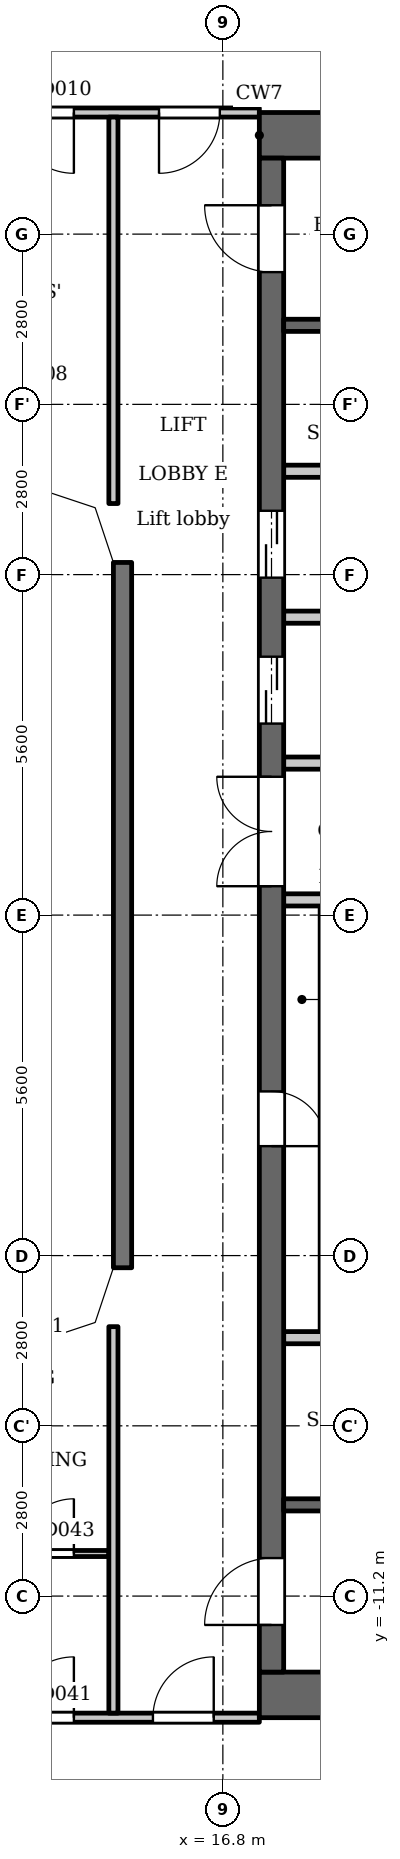
"""IFC4 building model, lengths in metres.
Left out: names, types, materials, properties, quantities, classifications, styles, units other than length and angle.
Written with IfcOpenShell. Run it as: python <this file> out.ifc"""

import sys

from ifc_helpers import new_model, si_unit, direction, frame, frame_2d, origin, place, context, subcontext, project, spatial, polyline, rectangle, outline, extrude, element, fill, save


model = new_model("IFC4")
c1 = context("Model", 3, precision=1e-05, world=origin(), true_north=direction((0.0, 1.0)))
c2 = subcontext(c1, "Body", "Model", "MODEL_VIEW")
j1 = project(units=[si_unit("LENGTHUNIT", "METRE"), si_unit("PLANEANGLEUNIT", "RADIAN")], contexts=[c1])
p1 = place(None, origin())
s1 = spatial("IfcSite", under=j1, at=p1, CompositionType="ELEMENT")
p2 = place(p1, origin())
s2 = spatial("IfcBuilding", under=s1, at=p2, CompositionType="ELEMENT")
p3 = place(p2, frame((0.0, 0.0, 223.9)))
s3 = spatial("IfcBuildingStorey", under=s2, at=p3, CompositionType="ELEMENT", Elevation=223.9)
p4 = place(p3, frame((15.15, 5.8, 0.0), z_axis=(0.0, 0.0, 1.0), x_axis=(0.0, -1.0, 0.0)))
e1 = element("IfcWall", 1, at=p4, inside=s3, PredefinedType="SOLIDWALL", context=c2, shape_type="SweptSolid", body=[
    extrude(rectangle(XDim=11.6, YDim=0.3, at=frame_2d((5.8, 0.0))), origin(), (0.0, 0.0, 1.0), 3.2),
])
for number, where, z_axis, x_axis in (
    (2, (17.4, 12.825, 0.0), (0.0, 0.0, 1.0), (1.0, 0.0, 0.0)),
    (3, (17.4, -12.825, 0.0), (0.0, 0.0, 1.0), (1.0, 0.0, 0.0)),
):
    element("IfcWall", number, at=place(p3, frame(where, z_axis=z_axis, x_axis=x_axis)), inside=s3, PredefinedType="SHEAR", context=c2, shape_type="SweptSolid", body=[
        extrude(rectangle(XDim=7.6, YDim=0.75, at=frame_2d((3.8, 0.0))), origin(), (0.0, 0.0, 1.0), 3.2),
    ])
p5 = place(p3, frame((17.6, -12.45, 0.0), z_axis=(0.0, 0.0, 1.0), x_axis=(0.0, 1.0, 0.0)))
e4 = element("IfcWall", 4, at=p5, inside=s3, PredefinedType="SHEAR", context=c2, shape_type="SweptSolid", body=[
    extrude(rectangle(XDim=24.9, YDim=0.4, at=frame_2d((12.45, 0.0))), origin(), (0.0, 0.0, 1.0), 3.2),
])
p6 = place(p5, frame((8.65, 0.0, 0.0)))
e5 = element("IfcOpeningElement", 5, at=p6, cuts=e4, PredefinedType="OPENING", context=c2, shape_type="SweptSolid", body=[
    extrude(rectangle(XDim=0.9, YDim=2.1, at=frame_2d((0.45, 1.05))), frame((0.0, 0.21, 0.0), z_axis=(0.0, -1.0, 0.0), x_axis=(1.0, 0.0, 0.0)), (0.0, 0.0, 1.0), 0.42),
])
p7 = place(p5, frame((15.6, 0.0, 0.0)))
e6 = element("IfcOpeningElement", 6, at=p7, cuts=e4, PredefinedType="OPENING", context=c2, shape_type="SweptSolid", body=[
    extrude(rectangle(XDim=1.1, YDim=2.1, at=frame_2d((0.55, 1.05))), frame((0.0, 0.21, 0.0), z_axis=(0.0, -1.0, 0.0), x_axis=(1.0, 0.0, 0.0)), (0.0, 0.0, 1.0), 0.42),
])
p8 = place(p5, frame((18.0, 0.0, 0.0)))
e7 = element("IfcOpeningElement", 7, at=p8, cuts=e4, PredefinedType="OPENING", context=c2, shape_type="SweptSolid", body=[
    extrude(rectangle(XDim=1.1, YDim=2.1, at=frame_2d((0.55, 1.05))), frame((0.0, 0.21, 0.0), z_axis=(0.0, -1.0, 0.0), x_axis=(1.0, 0.0, 0.0)), (0.0, 0.0, 1.0), 0.42),
])
p9 = place(p5, frame((23.025, 0.0, 0.0)))
e8 = element("IfcOpeningElement", 8, at=p9, cuts=e4, PredefinedType="OPENING", context=c2, shape_type="SweptSolid", body=[
    extrude(rectangle(XDim=1.1, YDim=2.1, at=frame_2d((0.55, 1.05))), frame((0.0, 0.21, 0.0), z_axis=(0.0, -1.0, 0.0), x_axis=(1.0, 0.0, 0.0)), (0.0, 0.0, 1.0), 0.42),
])
p10 = place(p5, frame((0.775, 0.0, 0.0)))
e9 = element("IfcOpeningElement", 9, at=p10, cuts=e4, PredefinedType="OPENING", context=c2, shape_type="SweptSolid", body=[
    extrude(rectangle(XDim=1.1, YDim=2.1, at=frame_2d((0.55, 1.05))), frame((0.0, 0.21, 0.0), z_axis=(0.0, -1.0, 0.0), x_axis=(1.0, 0.0, 0.0)), (0.0, 0.0, 1.0), 0.42),
])
p11 = place(p5, frame((12.925, 0.0, 0.0)))
e10 = element("IfcOpeningElement", 10, at=p11, cuts=e4, PredefinedType="OPENING", context=c2, shape_type="SweptSolid", body=[
    extrude(rectangle(XDim=1.8, YDim=2.1, at=frame_2d((0.9, 1.05))), frame((0.0, 0.21, 0.0), z_axis=(0.0, -1.0, 0.0), x_axis=(1.0, 0.0, 0.0)), (0.0, 0.0, 1.0), 0.42),
])
p12 = place(p3, frame((17.8, -9.7, 0.0), z_axis=(0.0, 0.0, 1.0), x_axis=(1.0, 0.0, 0.0)))
e11 = element("IfcWall", 11, at=p12, inside=s3, PredefinedType="SHEAR", context=c2, shape_type="SweptSolid", body=[
    extrude(rectangle(XDim=5.65, YDim=0.2, at=frame_2d((2.825, 0.0))), origin(), (0.0, 0.0, 1.0), 3.2),
])
p13 = place(p12, frame((0.85, 0.0, 0.0)))
e12 = element("IfcOpeningElement", 12, at=p13, cuts=e11, PredefinedType="OPENING", context=c2, shape_type="SweptSolid", body=[
    extrude(rectangle(XDim=1.1, YDim=2.1, at=frame_2d((0.55, 1.05))), frame((0.0, 0.11, 0.0), z_axis=(0.0, -1.0, 0.0), x_axis=(1.0, 0.0, 0.0)), (0.0, 0.0, 1.0), 0.22),
])
p14 = place(p12, frame((3.75, 0.0, 0.0)))
e13 = element("IfcOpeningElement", 13, at=p14, cuts=e11, PredefinedType="OPENING", context=c2, shape_type="SweptSolid", body=[
    extrude(rectangle(XDim=1.1, YDim=2.1, at=frame_2d((0.55, 1.05))), frame((0.0, 0.11, 0.0), z_axis=(0.0, -1.0, 0.0), x_axis=(1.0, 0.0, 0.0)), (0.0, 0.0, 1.0), 0.22),
])
p15 = place(p3, frame((17.8, -6.95, 0.0), z_axis=(0.0, 0.0, 1.0), x_axis=(1.0, 0.0, 0.0)))
e14 = element("IfcWall", 14, at=p15, inside=s3, PredefinedType="PARTITIONING", context=c2, shape_type="SweptSolid", body=[
    extrude(rectangle(XDim=2.8, YDim=0.2, at=frame_2d((1.4, 0.0))), origin(), (0.0, 0.0, 1.0), 3.2),
])
p16 = place(p3, frame((17.8, 0.25, 0.0), z_axis=(0.0, 0.0, 1.0), x_axis=(1.0, 0.0, 0.0)))
e15 = element("IfcWall", 15, at=p16, inside=s3, PredefinedType="PARTITIONING", context=c2, shape_type="SweptSolid", body=[
    extrude(rectangle(XDim=3.0, YDim=0.2, at=frame_2d((1.5, 0.0))), origin(), (0.0, 0.0, 1.0), 3.2),
])
p17 = place(p16, frame((1.35, 0.0, 0.0)))
e16 = element("IfcOpeningElement", 16, at=p17, cuts=e15, PredefinedType="OPENING", context=c2, shape_type="SweptSolid", body=[
    extrude(rectangle(XDim=0.9, YDim=2.1, at=frame_2d((0.45, 1.05))), frame((0.0, 0.11, 0.0), z_axis=(0.0, -1.0, 0.0), x_axis=(1.0, 0.0, 0.0)), (0.0, 0.0, 1.0), 0.22),
])
p18 = place(p3, frame((17.8, 2.5, 0.0), z_axis=(0.0, 0.0, 1.0), x_axis=(1.0, 0.0, 0.0)))
e17 = element("IfcWall", 17, at=p18, inside=s3, PredefinedType="PARTITIONING", context=c2, shape_type="SweptSolid", body=[
    extrude(rectangle(XDim=3.0, YDim=0.2, at=frame_2d((1.5, 0.0))), origin(), (0.0, 0.0, 1.0), 3.2),
])
for number, where, z_axis, x_axis in (
    (18, (17.8, 4.9, 0.0), (0.0, 0.0, 1.0), (1.0, 0.0, 0.0)),
    (19, (17.8, 7.3, 0.0), (0.0, 0.0, 1.0), (1.0, 0.0, 0.0)),
):
    element("IfcWall", number, at=place(p3, frame(where, z_axis=z_axis, x_axis=x_axis)), inside=s3, PredefinedType="PARTITIONING", context=c2, shape_type="SweptSolid", body=[
        extrude(rectangle(XDim=2.8, YDim=0.2, at=frame_2d((1.4, 0.0))), origin(), (0.0, 0.0, 1.0), 3.2),
    ])
p19 = place(p3, frame((17.8, 9.7, 0.0), z_axis=(0.0, 0.0, 1.0), x_axis=(1.0, 0.0, 0.0)))
e20 = element("IfcWall", 20, at=p19, inside=s3, PredefinedType="SHEAR", context=c2, shape_type="SweptSolid", body=[
    extrude(rectangle(XDim=5.65, YDim=0.2, at=frame_2d((2.825, 0.0))), origin(), (0.0, 0.0, 1.0), 3.2),
])
p20 = place(p19, frame((0.85, 0.0, 0.0)))
e21 = element("IfcOpeningElement", 21, at=p20, cuts=e20, PredefinedType="OPENING", context=c2, shape_type="SweptSolid", body=[
    extrude(rectangle(XDim=1.1, YDim=2.1, at=frame_2d((0.55, 1.05))), frame((0.0, 0.11, 0.0), z_axis=(0.0, -1.0, 0.0), x_axis=(1.0, 0.0, 0.0)), (0.0, 0.0, 1.0), 0.22),
])
p21 = place(p19, frame((3.75, 0.0, 0.0)))
e22 = element("IfcOpeningElement", 22, at=p21, cuts=e20, PredefinedType="OPENING", context=c2, shape_type="SweptSolid", body=[
    extrude(rectangle(XDim=1.1, YDim=2.1, at=frame_2d((0.55, 1.05))), frame((0.0, 0.11, 0.0), z_axis=(0.0, -1.0, 0.0), x_axis=(1.0, 0.0, 0.0)), (0.0, 0.0, 1.0), 0.22),
])
p22 = place(p3, frame((-17.4, -13.2, 0.0), z_axis=(0.0, 0.0, 1.0), x_axis=(1.0, 0.0, 0.0)))
e23 = element("IfcWall", 23, at=p22, inside=s3, PredefinedType="PARTITIONING", context=c2, shape_type="SweptSolid", body=[
    extrude(rectangle(XDim=34.8, YDim=0.15, at=frame_2d((17.4, 0.0))), origin(), (0.0, 0.0, 1.0), 3.2),
])
p23 = place(p22, frame((0.65, 0.0, 0.0)))
e24 = element("IfcOpeningElement", 24, at=p23, cuts=e23, PredefinedType="OPENING", context=c2, shape_type="SweptSolid", body=[
    extrude(rectangle(XDim=1.0, YDim=2.1, at=frame_2d((0.5, 1.05))), frame((0.0, 0.085, 0.0), z_axis=(0.0, -1.0, 0.0), x_axis=(1.0, 0.0, 0.0)), (0.0, 0.0, 1.0), 0.17),
])
p24 = place(p22, frame((33.05, 0.0, 0.0)))
e25 = element("IfcOpeningElement", 25, at=p24, cuts=e23, PredefinedType="OPENING", context=c2, shape_type="SweptSolid", body=[
    extrude(rectangle(XDim=1.0, YDim=2.1, at=frame_2d((0.5, 1.05))), frame((0.0, 0.085, 0.0), z_axis=(0.0, -1.0, 0.0), x_axis=(1.0, 0.0, 0.0)), (0.0, 0.0, 1.0), 0.17),
])
p25 = place(p22, frame((10.15, 0.0, 0.0)))
e26 = element("IfcOpeningElement", 26, at=p25, cuts=e23, PredefinedType="OPENING", context=c2, shape_type="SweptSolid", body=[
    extrude(rectangle(XDim=1.0, YDim=2.1, at=frame_2d((0.5, 1.05))), frame((0.0, 0.085, 0.0), z_axis=(0.0, -1.0, 0.0), x_axis=(1.0, 0.0, 0.0)), (0.0, 0.0, 1.0), 0.17),
])
p26 = place(p22, frame((12.5, 0.0, 0.0)))
e27 = element("IfcOpeningElement", 27, at=p26, cuts=e23, PredefinedType="OPENING", context=c2, shape_type="SweptSolid", body=[
    extrude(rectangle(XDim=1.0, YDim=2.1, at=frame_2d((0.5, 1.05))), frame((0.0, 0.085, 0.0), z_axis=(0.0, -1.0, 0.0), x_axis=(1.0, 0.0, 0.0)), (0.0, 0.0, 1.0), 0.17),
])
p27 = place(p22, frame((18.0, 0.0, 0.0)))
e28 = element("IfcOpeningElement", 28, at=p27, cuts=e23, PredefinedType="OPENING", context=c2, shape_type="SweptSolid", body=[
    extrude(rectangle(XDim=1.0, YDim=2.1, at=frame_2d((0.5, 1.05))), frame((0.0, 0.085, 0.0), z_axis=(0.0, -1.0, 0.0), x_axis=(1.0, 0.0, 0.0)), (0.0, 0.0, 1.0), 0.17),
])
p28 = place(p22, frame((30.75, 0.0, 0.0)))
e29 = element("IfcOpeningElement", 29, at=p28, cuts=e23, PredefinedType="OPENING", context=c2, shape_type="SweptSolid", body=[
    extrude(rectangle(XDim=1.0, YDim=2.1, at=frame_2d((0.5, 1.05))), frame((0.0, 0.085, 0.0), z_axis=(0.0, -1.0, 0.0), x_axis=(1.0, 0.0, 0.0)), (0.0, 0.0, 1.0), 0.17),
])
p29 = place(p3, frame((-14.925, -10.5, 0.0), z_axis=(0.0, 0.0, 1.0), x_axis=(1.0, 0.0, 0.0)))
e30 = element("IfcWall", 30, at=p29, inside=s3, PredefinedType="PARTITIONING", context=c2, shape_type="SweptSolid", body=[
    extrude(rectangle(XDim=29.85, YDim=0.1, at=frame_2d((14.925, 0.0))), origin(), (0.0, 0.0, 1.0), 3.2),
])
p30 = place(p29, frame((2.325, 0.0, 0.0)))
e31 = element("IfcOpeningElement", 31, at=p30, cuts=e30, PredefinedType="OPENING", context=c2, shape_type="SweptSolid", body=[
    extrude(rectangle(XDim=0.8, YDim=2.1, at=frame_2d((0.4, 1.05))), frame((0.0, 0.06, 0.0), z_axis=(0.0, -1.0, 0.0), x_axis=(1.0, 0.0, 0.0)), (0.0, 0.0, 1.0), 0.12),
])
p31 = place(p29, frame((7.775, 0.0, 0.0)))
e32 = element("IfcOpeningElement", 32, at=p31, cuts=e30, PredefinedType="OPENING", context=c2, shape_type="SweptSolid", body=[
    extrude(rectangle(XDim=0.9, YDim=2.1, at=frame_2d((0.45, 1.05))), frame((0.0, 0.06, 0.0), z_axis=(0.0, -1.0, 0.0), x_axis=(1.0, 0.0, 0.0)), (0.0, 0.0, 1.0), 0.12),
])
p32 = place(p29, frame((13.575, 0.0, 0.0)))
e33 = element("IfcOpeningElement", 33, at=p32, cuts=e30, PredefinedType="OPENING", context=c2, shape_type="SweptSolid", body=[
    extrude(rectangle(XDim=0.8, YDim=2.1, at=frame_2d((0.4, 1.05))), frame((0.0, 0.06, 0.0), z_axis=(0.0, -1.0, 0.0), x_axis=(1.0, 0.0, 0.0)), (0.0, 0.0, 1.0), 0.12),
])
p33 = place(p29, frame((10.125, 0.0, 0.0)))
e34 = element("IfcOpeningElement", 34, at=p33, cuts=e30, PredefinedType="OPENING", context=c2, shape_type="SweptSolid", body=[
    extrude(rectangle(XDim=0.9, YDim=2.1, at=frame_2d((0.45, 1.05))), frame((0.0, 0.06, 0.0), z_axis=(0.0, -1.0, 0.0), x_axis=(1.0, 0.0, 0.0)), (0.0, 0.0, 1.0), 0.12),
])
p34 = place(p29, frame((18.825, 0.0, 0.0)))
e35 = element("IfcOpeningElement", 35, at=p34, cuts=e30, PredefinedType="OPENING", context=c2, shape_type="SweptSolid", body=[
    extrude(rectangle(XDim=0.8, YDim=2.1, at=frame_2d((0.4, 1.05))), frame((0.0, 0.06, 0.0), z_axis=(0.0, -1.0, 0.0), x_axis=(1.0, 0.0, 0.0)), (0.0, 0.0, 1.0), 0.12),
])
p35 = place(p29, frame((15.625, 0.0, 0.0)))
e36 = element("IfcOpeningElement", 36, at=p35, cuts=e30, PredefinedType="OPENING", context=c2, shape_type="SweptSolid", body=[
    extrude(rectangle(XDim=0.9, YDim=2.1, at=frame_2d((0.45, 1.05))), frame((0.0, 0.06, 0.0), z_axis=(0.0, -1.0, 0.0), x_axis=(1.0, 0.0, 0.0)), (0.0, 0.0, 1.0), 0.12),
])
p36 = place(p29, frame((24.675, 0.0, 0.0)))
e37 = element("IfcOpeningElement", 37, at=p36, cuts=e30, PredefinedType="OPENING", context=c2, shape_type="SweptSolid", body=[
    extrude(rectangle(XDim=0.8, YDim=2.1, at=frame_2d((0.4, 1.05))), frame((0.0, 0.06, 0.0), z_axis=(0.0, -1.0, 0.0), x_axis=(1.0, 0.0, 0.0)), (0.0, 0.0, 1.0), 0.12),
])
p37 = place(p29, frame((28.375, 0.0, 0.0)))
e38 = element("IfcOpeningElement", 38, at=p37, cuts=e30, PredefinedType="OPENING", context=c2, shape_type="SweptSolid", body=[
    extrude(rectangle(XDim=0.9, YDim=2.1, at=frame_2d((0.45, 1.05))), frame((0.0, 0.06, 0.0), z_axis=(0.0, -1.0, 0.0), x_axis=(1.0, 0.0, 0.0)), (0.0, 0.0, 1.0), 0.12),
])
p38 = place(p3, frame((-17.4, 13.2, 0.0), z_axis=(0.0, 0.0, 1.0), x_axis=(1.0, 0.0, 0.0)))
e39 = element("IfcWall", 39, at=p38, inside=s3, PredefinedType="PARTITIONING", context=c2, shape_type="SweptSolid", body=[
    extrude(rectangle(XDim=34.8, YDim=0.15, at=frame_2d((17.4, 0.0))), origin(), (0.0, 0.0, 1.0), 3.2),
])
p39 = place(p38, frame((0.75, 0.0, 0.0)))
e40 = element("IfcOpeningElement", 40, at=p39, cuts=e39, PredefinedType="OPENING", context=c2, shape_type="SweptSolid", body=[
    extrude(rectangle(XDim=1.0, YDim=2.1, at=frame_2d((0.5, 1.05))), frame((0.0, 0.085, 0.0), z_axis=(0.0, -1.0, 0.0), x_axis=(1.0, 0.0, 0.0)), (0.0, 0.0, 1.0), 0.17),
])
p40 = place(p38, frame((33.15, 0.0, 0.0)))
e41 = element("IfcOpeningElement", 41, at=p40, cuts=e39, PredefinedType="OPENING", context=c2, shape_type="SweptSolid", body=[
    extrude(rectangle(XDim=1.0, YDim=2.1, at=frame_2d((0.5, 1.05))), frame((0.0, 0.085, 0.0), z_axis=(0.0, -1.0, 0.0), x_axis=(1.0, 0.0, 0.0)), (0.0, 0.0, 1.0), 0.17),
])
p41 = place(p38, frame((3.05, 0.0, 0.0)))
e42 = element("IfcOpeningElement", 42, at=p41, cuts=e39, PredefinedType="OPENING", context=c2, shape_type="SweptSolid", body=[
    extrude(rectangle(XDim=1.0, YDim=2.1, at=frame_2d((0.5, 1.05))), frame((0.0, 0.085, 0.0), z_axis=(0.0, -1.0, 0.0), x_axis=(1.0, 0.0, 0.0)), (0.0, 0.0, 1.0), 0.17),
])
p42 = place(p38, frame((10.1, 0.0, 0.0)))
e43 = element("IfcOpeningElement", 43, at=p42, cuts=e39, PredefinedType="OPENING", context=c2, shape_type="SweptSolid", body=[
    extrude(rectangle(XDim=1.0, YDim=2.1, at=frame_2d((0.5, 1.05))), frame((0.0, 0.085, 0.0), z_axis=(0.0, -1.0, 0.0), x_axis=(1.0, 0.0, 0.0)), (0.0, 0.0, 1.0), 0.17),
])
p43 = place(p38, frame((12.45, 0.0, 0.0)))
e44 = element("IfcOpeningElement", 44, at=p43, cuts=e39, PredefinedType="OPENING", context=c2, shape_type="SweptSolid", body=[
    extrude(rectangle(XDim=1.0, YDim=2.1, at=frame_2d((0.5, 1.05))), frame((0.0, 0.085, 0.0), z_axis=(0.0, -1.0, 0.0), x_axis=(1.0, 0.0, 0.0)), (0.0, 0.0, 1.0), 0.17),
])
p44 = place(p38, frame((21.3, 0.0, 0.0)))
e45 = element("IfcOpeningElement", 45, at=p44, cuts=e39, PredefinedType="OPENING", context=c2, shape_type="SweptSolid", body=[
    extrude(rectangle(XDim=1.0, YDim=2.1, at=frame_2d((0.5, 1.05))), frame((0.0, 0.085, 0.0), z_axis=(0.0, -1.0, 0.0), x_axis=(1.0, 0.0, 0.0)), (0.0, 0.0, 1.0), 0.17),
])
p45 = place(p38, frame((23.65, 0.0, 0.0)))
e46 = element("IfcOpeningElement", 46, at=p45, cuts=e39, PredefinedType="OPENING", context=c2, shape_type="SweptSolid", body=[
    extrude(rectangle(XDim=1.0, YDim=2.1, at=frame_2d((0.5, 1.05))), frame((0.0, 0.085, 0.0), z_axis=(0.0, -1.0, 0.0), x_axis=(1.0, 0.0, 0.0)), (0.0, 0.0, 1.0), 0.17),
])
p46 = place(p38, frame((30.75, 0.0, 0.0)))
e47 = element("IfcOpeningElement", 47, at=p46, cuts=e39, PredefinedType="OPENING", context=c2, shape_type="SweptSolid", body=[
    extrude(rectangle(XDim=1.0, YDim=2.1, at=frame_2d((0.5, 1.05))), frame((0.0, 0.085, 0.0), z_axis=(0.0, -1.0, 0.0), x_axis=(1.0, 0.0, 0.0)), (0.0, 0.0, 1.0), 0.17),
])
for number, where, z_axis, x_axis in (
    (48, (15.0, -13.125, 0.0), (0.0, 0.0, 1.0), (0.0, 1.0, 0.0)),
    (49, (15.0, 6.769, 0.0), (0.0, 0.0, 1.0), (0.0, 1.0, 0.0)),
):
    element("IfcWall", number, at=place(p3, frame(where, z_axis=z_axis, x_axis=x_axis)), inside=s3, PredefinedType="PARTITIONING", context=c2, shape_type="SweptSolid", body=[
        extrude(rectangle(XDim=6.356, YDim=0.15, at=frame_2d((3.178, 0.0))), origin(), (0.0, 0.0, 1.0), 3.2),
    ])
p47 = place(p3, origin())
e50 = element("IfcWall", 50, at=p47, inside=s3, PredefinedType="SOLIDWALL", context=c2, shape_type="SweptSolid", body=[
    extrude(outline(polyline([(14.937, 6.937), (13.849, 7.3), (13.8, 7.3), (13.8, 7.0), (14.7, 6.7), (15.0, 5.8), (15.3, 5.8), (15.3, 5.849), (14.937, 6.937)])), origin(), (0.0, 0.0, 1.0), 3.2),
])
e51 = element("IfcWall", 51, at=p47, inside=s3, PredefinedType="SOLIDWALL", context=c2, shape_type="SweptSolid", body=[
    extrude(outline(polyline([(14.937, -6.937), (15.3, -5.849), (15.3, -5.8), (15.0, -5.8), (14.7, -6.7), (13.8, -7.0), (13.8, -7.3), (13.849, -7.3), (14.937, -6.937)])), origin(), (0.0, 0.0, 1.0), 3.2),
])
p48 = place(p6, origin())
e52 = element("IfcDoor", 52, at=p48, inside=s3, OperationType="SINGLE_SWING_LEFT", PredefinedType="DOOR", context=c2, shape_type="SweptSolid", body=[
    extrude(rectangle(XDim=0.9, YDim=2.1, at=frame_2d((0.45, 1.05))), frame((0.0, 0.025, 0.0), z_axis=(0.0, -1.0, 0.0), x_axis=(1.0, 0.0, 0.0)), (0.0, 0.0, 1.0), 0.05),
])
fill(e5, e52)
p49 = place(p7, origin())
e53 = element("IfcDoor", 53, at=p49, inside=s3, OperationType="DOUBLE_DOOR_SLIDING", PredefinedType="DOOR", context=c2, shape_type="SweptSolid", body=[
    extrude(rectangle(XDim=1.1, YDim=2.1, at=frame_2d((0.55, 1.05))), frame((0.0, 0.025, 0.0), z_axis=(0.0, -1.0, 0.0), x_axis=(1.0, 0.0, 0.0)), (0.0, 0.0, 1.0), 0.05),
])
fill(e6, e53)
p50 = place(p8, origin())
e54 = element("IfcDoor", 54, at=p50, inside=s3, OperationType="DOUBLE_DOOR_SLIDING", PredefinedType="DOOR", context=c2, shape_type="SweptSolid", body=[
    extrude(rectangle(XDim=1.1, YDim=2.1, at=frame_2d((0.55, 1.05))), frame((0.0, 0.025, 0.0), z_axis=(0.0, -1.0, 0.0), x_axis=(1.0, 0.0, 0.0)), (0.0, 0.0, 1.0), 0.05),
])
fill(e7, e54)
p51 = place(p9, origin())
e55 = element("IfcDoor", 55, at=p51, inside=s3, OperationType="SINGLE_SWING_LEFT", PredefinedType="DOOR", context=c2, shape_type="SweptSolid", body=[
    extrude(rectangle(XDim=1.1, YDim=2.1, at=frame_2d((0.55, 1.05))), frame((0.0, 0.025, 0.0), z_axis=(0.0, -1.0, 0.0), x_axis=(1.0, 0.0, 0.0)), (0.0, 0.0, 1.0), 0.05),
])
fill(e8, e55)
p52 = place(p10, origin())
e56 = element("IfcDoor", 56, at=p52, inside=s3, OperationType="SINGLE_SWING_RIGHT", PredefinedType="DOOR", context=c2, shape_type="SweptSolid", body=[
    extrude(rectangle(XDim=1.1, YDim=2.1, at=frame_2d((0.55, 1.05))), frame((0.0, 0.025, 0.0), z_axis=(0.0, -1.0, 0.0), x_axis=(1.0, 0.0, 0.0)), (0.0, 0.0, 1.0), 0.05),
])
fill(e9, e56)
p53 = place(p11, origin())
e57 = element("IfcDoor", 57, at=p53, inside=s3, OperationType="DOUBLE_DOOR_SINGLE_SWING", PredefinedType="DOOR", context=c2, shape_type="SweptSolid", body=[
    extrude(rectangle(XDim=1.8, YDim=2.1, at=frame_2d((0.9, 1.05))), frame((0.0, 0.025, 0.0), z_axis=(0.0, -1.0, 0.0), x_axis=(1.0, 0.0, 0.0)), (0.0, 0.0, 1.0), 0.05),
])
fill(e10, e57)
p54 = place(p40, origin())
e58 = element("IfcDoor", 58, at=p54, inside=s3, OperationType="SINGLE_SWING_LEFT", PredefinedType="DOOR", context=c2, shape_type="SweptSolid", body=[
    extrude(rectangle(XDim=1.0, YDim=2.1, at=frame_2d((0.5, 1.05))), frame((0.0, 0.025, 0.0), z_axis=(0.0, -1.0, 0.0), x_axis=(1.0, 0.0, 0.0)), (0.0, 0.0, 1.0), 0.05),
])
fill(e41, e58)
p55 = place(p24, origin())
e59 = element("IfcDoor", 59, at=p55, inside=s3, OperationType="SINGLE_SWING_LEFT", PredefinedType="DOOR", context=c2, shape_type="SweptSolid", body=[
    extrude(rectangle(XDim=1.0, YDim=2.1, at=frame_2d((0.5, 1.05))), frame((0.0, 0.025, 0.0), z_axis=(0.0, -1.0, 0.0), x_axis=(1.0, 0.0, 0.0)), (0.0, 0.0, 1.0), 0.05),
])
fill(e25, e59)
p56 = place(p46, origin())
e60 = element("IfcDoor", 60, at=p56, inside=s3, OperationType="SINGLE_SWING_RIGHT", PredefinedType="DOOR", context=c2, shape_type="SweptSolid", body=[
    extrude(rectangle(XDim=1.0, YDim=2.1, at=frame_2d((0.5, 1.05))), frame((0.0, 0.025, 0.0), z_axis=(0.0, -1.0, 0.0), x_axis=(1.0, 0.0, 0.0)), (0.0, 0.0, 1.0), 0.05),
])
fill(e47, e60)
p57 = place(p28, origin())
e61 = element("IfcDoor", 61, at=p57, inside=s3, OperationType="SINGLE_SWING_LEFT", PredefinedType="DOOR", context=c2, shape_type="SweptSolid", body=[
    extrude(rectangle(XDim=1.0, YDim=2.1, at=frame_2d((0.5, 1.05))), frame((0.0, 0.025, 0.0), z_axis=(0.0, -1.0, 0.0), x_axis=(1.0, 0.0, 0.0)), (0.0, 0.0, 1.0), 0.05),
])
fill(e29, e61)
p58 = place(p37, origin())
e62 = element("IfcDoor", 62, at=p58, inside=s3, OperationType="SINGLE_SWING_LEFT", PredefinedType="DOOR", context=c2, shape_type="SweptSolid", body=[
    extrude(rectangle(XDim=0.9, YDim=2.1, at=frame_2d((0.45, 1.05))), frame((0.0, 0.025, 0.0), z_axis=(0.0, -1.0, 0.0), x_axis=(1.0, 0.0, 0.0)), (0.0, 0.0, 1.0), 0.05),
])
fill(e38, e62)
save(model, sys.argv[1])
